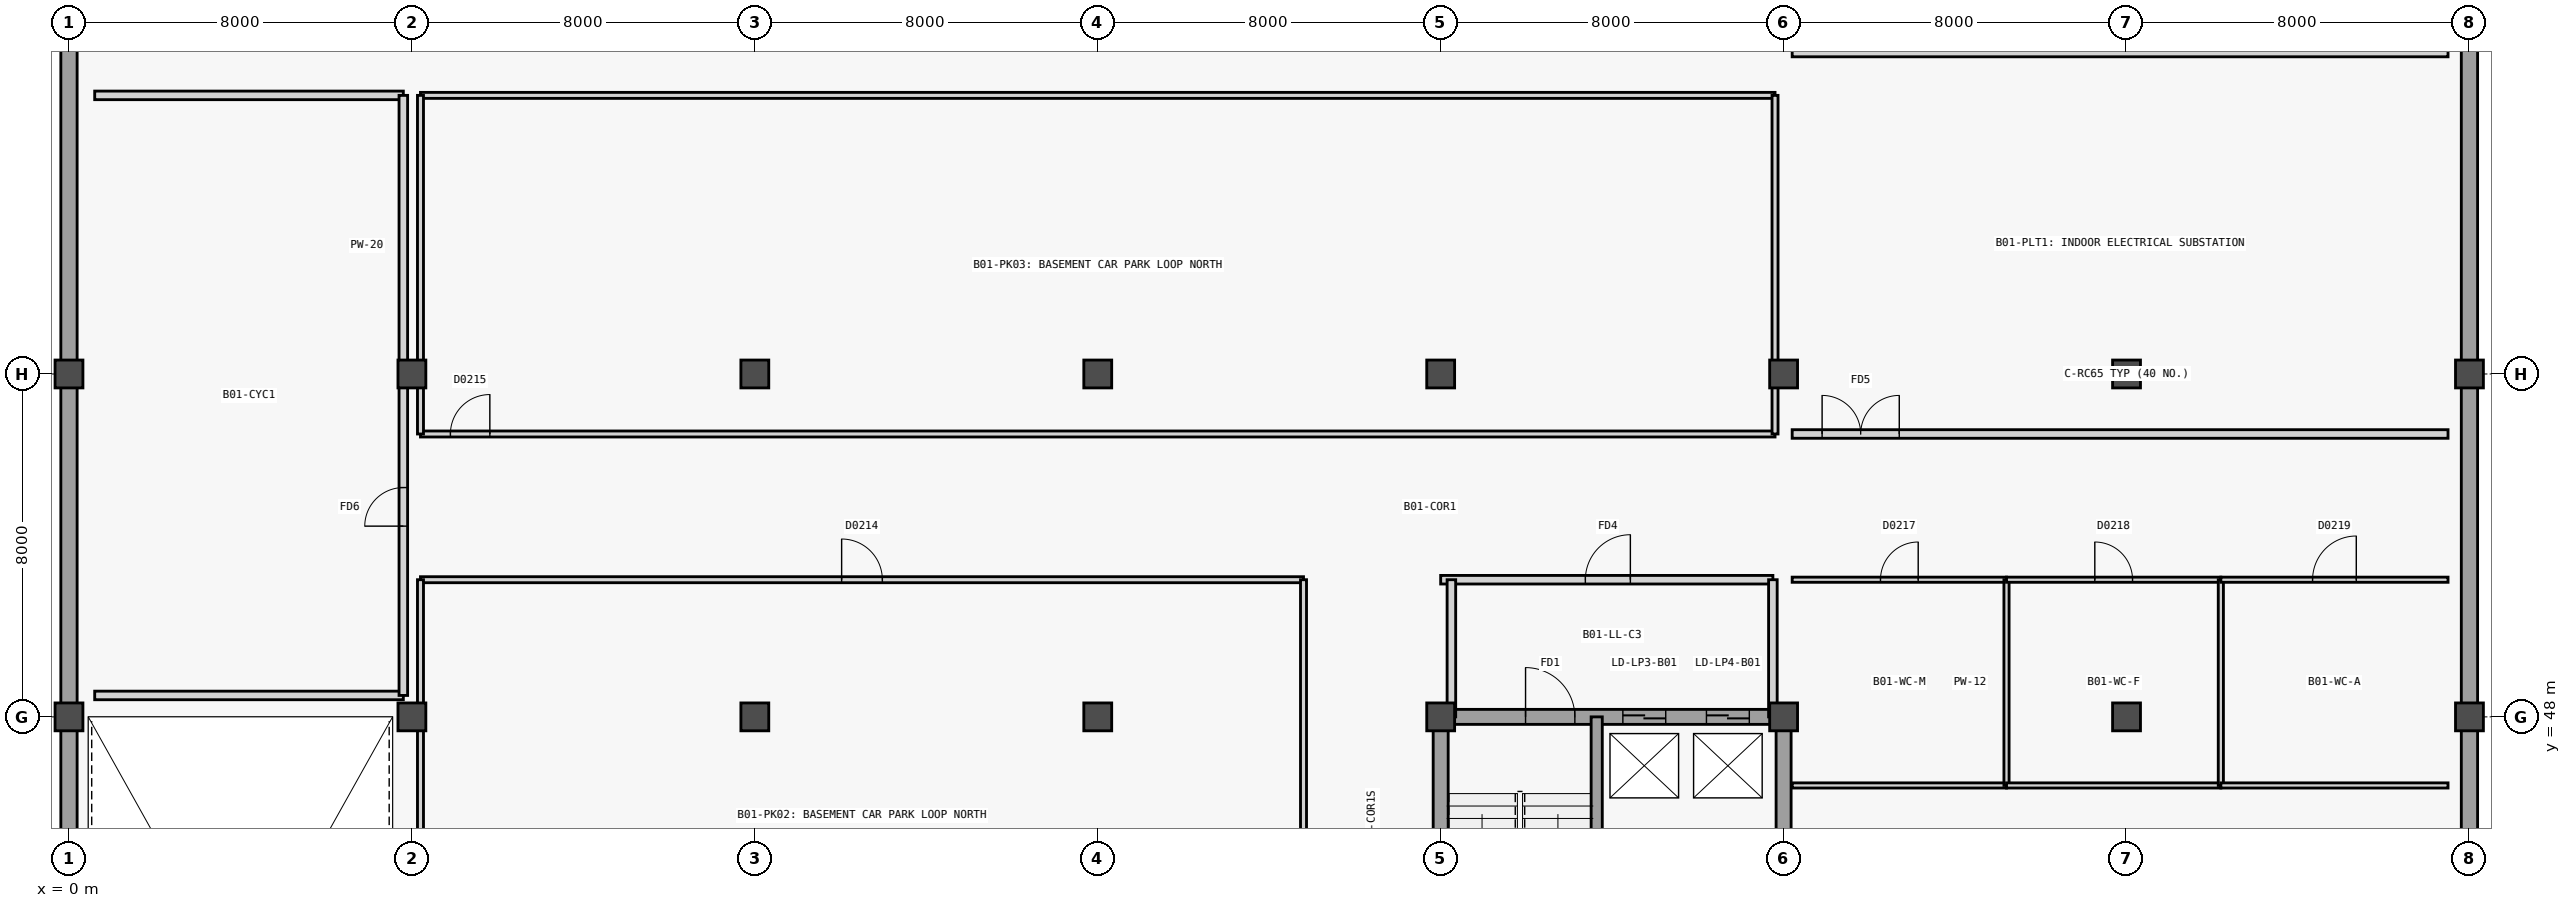
"""IFC4 building model, lengths in metres.
Left out: names, types, materials, properties, quantities, classifications, styles, units other than length and angle.
Written with IfcOpenShell. Run it as: python <this file> out.ifc"""

import sys

from ifc_helpers import new_model, si_unit, direction, frame, frame_2d, origin, origin_2d, place, context, subcontext, project, spatial, rectangle, extrude, element, fill, save


model = new_model("IFC4")
c1 = context("Model", 3, precision=1e-05, world=origin(), true_north=direction((0.0, 1.0)))
c2 = subcontext(c1, "Body", "Model", "MODEL_VIEW")
j1 = project(units=[si_unit("LENGTHUNIT", "METRE"), si_unit("PLANEANGLEUNIT", "RADIAN")], contexts=[c1])
p1 = place(None, origin())
s1 = spatial("IfcSite", under=j1, at=p1, CompositionType="ELEMENT")
p2 = place(p1, origin())
s2 = spatial("IfcBuilding", under=s1, at=p2, CompositionType="ELEMENT")
p3 = place(p2, frame((0.0, 0.0, -4.5)))
s3 = spatial("IfcBuildingStorey", under=s2, at=p3, CompositionType="ELEMENT", Elevation=-4.5)
for number, where, z_axis, x_axis in (
    (1, (0.0, 48.0, -0.45), (0.0, 0.0, 1.0), (1.0, 0.0, 0.0)),
    (2, (0.0, 56.0, -0.45), (0.0, 0.0, 1.0), (1.0, 0.0, 0.0)),
    (3, (8.0, 48.0, -0.45), (0.0, 0.0, 1.0), (1.0, 0.0, 0.0)),
    (4, (8.0, 56.0, -0.45), (0.0, 0.0, 1.0), (1.0, 0.0, 0.0)),
    (5, (16.0, 48.0, -0.45), (0.0, 0.0, 1.0), (1.0, 0.0, 0.0)),
    (6, (16.0, 56.0, -0.45), (0.0, 0.0, 1.0), (1.0, 0.0, 0.0)),
    (7, (24.0, 48.0, -0.45), (0.0, 0.0, 1.0), (1.0, 0.0, 0.0)),
    (8, (24.0, 56.0, -0.45), (0.0, 0.0, 1.0), (1.0, 0.0, 0.0)),
    (9, (32.0, 48.0, -0.45), (0.0, 0.0, 1.0), (1.0, 0.0, 0.0)),
    (10, (32.0, 56.0, -0.45), (0.0, 0.0, 1.0), (1.0, 0.0, 0.0)),
    (11, (40.0, 48.0, -0.45), (0.0, 0.0, 1.0), (1.0, 0.0, 0.0)),
    (12, (40.0, 56.0, -0.45), (0.0, 0.0, 1.0), (1.0, 0.0, 0.0)),
    (13, (48.0, 48.0, -0.45), (0.0, 0.0, 1.0), (1.0, 0.0, 0.0)),
    (14, (48.0, 56.0, -0.45), (0.0, 0.0, 1.0), (1.0, 0.0, 0.0)),
    (15, (56.0, 48.0, -0.45), (0.0, 0.0, 1.0), (1.0, 0.0, 0.0)),
    (16, (56.0, 56.0, -0.45), (0.0, 0.0, 1.0), (1.0, 0.0, 0.0)),
):
    element("IfcColumn", number, at=place(p3, frame(where, z_axis=z_axis, x_axis=x_axis)), inside=s3, PredefinedType="COLUMN", context=c2, shape_type="SweptSolid", body=[
        extrude(rectangle(XDim=0.65, YDim=0.65, at=origin_2d()), origin(), (0.0, 0.0, 1.0), 4.95),
    ])
for number, where, z_axis, x_axis in (
    (17, (0.0, 0.0, 0.0), (0.0, 0.0, 1.0), (0.0, 1.0, 0.0)),
    (18, (56.0, 64.0, 0.0), (0.0, 0.0, 1.0), (0.0, -1.0, 0.0)),
):
    element("IfcWall", number, at=place(p3, frame(where, z_axis=z_axis, x_axis=x_axis)), inside=s3, PredefinedType="USERDEFINED", context=c2, shape_type="SweptSolid", body=[
        extrude(rectangle(XDim=64.0, YDim=0.38, at=frame_2d((32.0, 0.0))), origin(), (0.0, 0.0, 1.0), 4.05),
    ])
for number, where, z_axis, x_axis in (
    (19, (32.0, 40.0, 0.0), (0.0, 0.0, 1.0), (0.0, 1.0, 0.0)),
    (20, (40.0, 40.0, 0.0), (0.0, 0.0, 1.0), (0.0, 1.0, 0.0)),
):
    element("IfcWall", number, at=place(p3, frame(where, z_axis=z_axis, x_axis=x_axis)), inside=s3, PredefinedType="SHEAR", context=c2, shape_type="SweptSolid", body=[
        extrude(rectangle(XDim=8.0, YDim=0.35, at=frame_2d((4.0, 0.0))), origin(), (0.0, 0.0, 1.0), 4.5),
    ])
p4 = place(p3, frame((32.0, 48.0, 0.0), z_axis=(0.0, 0.0, 1.0), x_axis=(1.0, 0.0, 0.0)))
e21 = element("IfcWall", 21, at=p4, inside=s3, PredefinedType="SHEAR", context=c2, shape_type="SweptSolid", body=[
    extrude(rectangle(XDim=8.0, YDim=0.35, at=frame_2d((4.0, 0.0))), origin(), (0.0, 0.0, 1.0), 4.5),
])
p5 = place(p4, frame((1.98, 0.0, 0.0)))
e22 = element("IfcOpeningElement", 22, at=p5, cuts=e21, PredefinedType="OPENING", context=c2, shape_type="SweptSolid", body=[
    extrude(rectangle(XDim=1.15, YDim=2.2, at=frame_2d((0.575, 1.1))), frame((0.0, 0.185, 0.0), z_axis=(0.0, -1.0, 0.0), x_axis=(1.0, 0.0, 0.0)), (0.0, 0.0, 1.0), 0.37),
])
p6 = place(p4, frame((4.25, 0.0, 0.0)))
e23 = element("IfcOpeningElement", 23, at=p6, cuts=e21, PredefinedType="OPENING", context=c2, shape_type="SweptSolid", body=[
    extrude(rectangle(XDim=1.0, YDim=2.15, at=frame_2d((0.5, 1.075))), frame((0.0, 0.185, 0.0), z_axis=(0.0, -1.0, 0.0), x_axis=(1.0, 0.0, 0.0)), (0.0, 0.0, 1.0), 0.37),
])
p7 = place(p4, frame((6.2, 0.0, 0.0)))
e24 = element("IfcOpeningElement", 24, at=p7, cuts=e21, PredefinedType="OPENING", context=c2, shape_type="SweptSolid", body=[
    extrude(rectangle(XDim=1.0, YDim=2.15, at=frame_2d((0.5, 1.075))), frame((0.0, 0.185, 0.0), z_axis=(0.0, -1.0, 0.0), x_axis=(1.0, 0.0, 0.0)), (0.0, 0.0, 1.0), 0.37),
])
p8 = place(p3, frame((35.64, 40.0, 0.0), z_axis=(0.0, 0.0, 1.0), x_axis=(0.0, 1.0, 0.0)))
e25 = element("IfcWall", 25, at=p8, inside=s3, PredefinedType="SHEAR", context=c2, shape_type="SweptSolid", body=[
    extrude(rectangle(XDim=8.0, YDim=0.26, at=frame_2d((4.0, 0.0))), origin(), (0.0, 0.0, 1.0), 4.5),
])
p9 = place(p3, frame((32.0, 51.2, 0.0), z_axis=(0.0, 0.0, 1.0), x_axis=(1.0, 0.0, 0.0)))
e26 = element("IfcWall", 26, at=p9, inside=s3, PredefinedType="PARTITIONING", context=c2, shape_type="SweptSolid", body=[
    extrude(rectangle(XDim=7.75, YDim=0.2, at=frame_2d((3.875, 0.0))), origin(), (0.0, 0.0, 1.0), 4.22),
])
p10 = place(p9, frame((3.375, 0.0, 0.0)))
e27 = element("IfcOpeningElement", 27, at=p10, cuts=e26, PredefinedType="OPENING", context=c2, shape_type="SweptSolid", body=[
    extrude(rectangle(XDim=1.05, YDim=2.15, at=frame_2d((0.525, 1.075))), frame((0.0, 0.11, 0.0), z_axis=(0.0, -1.0, 0.0), x_axis=(1.0, 0.0, 0.0)), (0.0, 0.0, 1.0), 0.22),
])
for number, where, z_axis, x_axis in (
    (28, (39.75, 48.0, 0.0), (0.0, 0.0, 1.0), (0.0, 1.0, 0.0)),
    (29, (32.25, 48.0, 0.0), (0.0, 0.0, 1.0), (0.0, 1.0, 0.0)),
):
    element("IfcWall", number, at=place(p3, frame(where, z_axis=z_axis, x_axis=x_axis)), inside=s3, PredefinedType="PARTITIONING", context=c2, shape_type="SweptSolid", body=[
        extrude(rectangle(XDim=3.2, YDim=0.2, at=frame_2d((1.6, 0.0))), origin(), (0.0, 0.0, 1.0), 3.6),
    ])
p11 = place(p3, frame((8.2, 51.2, 0.0), z_axis=(0.0, 0.0, 1.0), x_axis=(1.0, 0.0, 0.0)))
e30 = element("IfcWall", 30, at=p11, inside=s3, PredefinedType="PARTITIONING", context=c2, shape_type="SweptSolid", body=[
    extrude(rectangle(XDim=20.6, YDim=0.14, at=frame_2d((10.3, 0.0))), origin(), (0.0, 0.0, 1.0), 4.24),
])
p12 = place(p11, frame((9.825, 0.0, 0.0)))
e31 = element("IfcOpeningElement", 31, at=p12, cuts=e30, PredefinedType="OPENING", context=c2, shape_type="SweptSolid", body=[
    extrude(rectangle(XDim=0.95, YDim=2.1, at=frame_2d((0.475, 1.05))), frame((0.0, 0.08, 0.0), z_axis=(0.0, -1.0, 0.0), x_axis=(1.0, 0.0, 0.0)), (0.0, 0.0, 1.0), 0.16),
])
p13 = place(p3, frame((8.2, 40.2, 0.0), z_axis=(0.0, 0.0, 1.0), x_axis=(0.0, 1.0, 0.0)))
e32 = element("IfcWall", 32, at=p13, inside=s3, PredefinedType="PARTITIONING", context=c2, shape_type="SweptSolid", body=[
    extrude(rectangle(XDim=11.0, YDim=0.14, at=frame_2d((5.5, 0.0))), origin(), (0.0, 0.0, 1.0), 3.6),
])
p14 = place(p3, frame((28.8, 40.2, 0.0), z_axis=(0.0, 0.0, 1.0), x_axis=(0.0, 1.0, 0.0)))
e33 = element("IfcWall", 33, at=p14, inside=s3, PredefinedType="PARTITIONING", context=c2, shape_type="SweptSolid", body=[
    extrude(rectangle(XDim=11.0, YDim=0.14, at=frame_2d((5.5, 0.0))), origin(), (0.0, 0.0, 1.0), 4.24),
])
p15 = place(p3, frame((8.2, 54.6, 0.0), z_axis=(0.0, 0.0, 1.0), x_axis=(1.0, 0.0, 0.0)))
e34 = element("IfcWall", 34, at=p15, inside=s3, PredefinedType="PARTITIONING", context=c2, shape_type="SweptSolid", body=[
    extrude(rectangle(XDim=31.6, YDim=0.14, at=frame_2d((15.8, 0.0))), origin(), (0.0, 0.0, 1.0), 4.24),
])
p16 = place(p15, frame((0.698, 0.0, 0.0)))
e35 = element("IfcOpeningElement", 35, at=p16, cuts=e34, PredefinedType="OPENING", context=c2, shape_type="SweptSolid", body=[
    extrude(rectangle(XDim=0.92, YDim=2.15, at=frame_2d((0.46, 1.075))), frame((0.0, 0.08, 0.0), z_axis=(0.0, -1.0, 0.0), x_axis=(1.0, 0.0, 0.0)), (0.0, 0.0, 1.0), 0.16),
])
p17 = place(p3, frame((8.2, 62.5, 0.0), z_axis=(0.0, 0.0, 1.0), x_axis=(1.0, 0.0, 0.0)))
e36 = element("IfcWall", 36, at=p17, inside=s3, PredefinedType="PARTITIONING", context=c2, shape_type="SweptSolid", body=[
    extrude(rectangle(XDim=31.6, YDim=0.14, at=frame_2d((15.8, 0.0))), origin(), (0.0, 0.0, 1.0), 4.24),
])
for number, where, z_axis, x_axis in (
    (37, (8.2, 54.6, 0.0), (0.0, 0.0, 1.0), (0.0, 1.0, 0.0)),
    (38, (39.8, 54.6, 0.0), (0.0, 0.0, 1.0), (0.0, 1.0, 0.0)),
):
    element("IfcWall", number, at=place(p3, frame(where, z_axis=z_axis, x_axis=x_axis)), inside=s3, PredefinedType="PARTITIONING", context=c2, shape_type="SweptSolid", body=[
        extrude(rectangle(XDim=7.9, YDim=0.14, at=frame_2d((3.95, 0.0))), origin(), (0.0, 0.0, 1.0), 3.6),
    ])
for number, where, z_axis, x_axis in (
    (39, (0.6, 48.5, 0.0), (0.0, 0.0, 1.0), (1.0, 0.0, 0.0)),
    (40, (0.6, 62.5, 0.0), (0.0, 0.0, 1.0), (1.0, 0.0, 0.0)),
):
    element("IfcWall", number, at=place(p3, frame(where, z_axis=z_axis, x_axis=x_axis)), inside=s3, PredefinedType="PARTITIONING", context=c2, shape_type="SweptSolid", body=[
        extrude(rectangle(XDim=7.2, YDim=0.2, at=frame_2d((3.6, 0.0))), origin(), (0.0, 0.0, 1.0), 4.24),
    ])
p18 = place(p3, frame((7.8, 48.5, 0.0), z_axis=(0.0, 0.0, 1.0), x_axis=(0.0, 1.0, 0.0)))
e41 = element("IfcWall", 41, at=p18, inside=s3, PredefinedType="PARTITIONING", context=c2, shape_type="SweptSolid", body=[
    extrude(rectangle(XDim=14.0, YDim=0.2, at=frame_2d((7.0, 0.0))), origin(), (0.0, 0.0, 1.0), 3.6),
])
p19 = place(p18, frame((3.95, 0.0, 0.0)))
e42 = element("IfcOpeningElement", 42, at=p19, cuts=e41, PredefinedType="OPENING", context=c2, shape_type="SweptSolid", body=[
    extrude(rectangle(XDim=0.9, YDim=2.1, at=frame_2d((0.45, 1.05))), frame((0.0, 0.11, 0.0), z_axis=(0.0, -1.0, 0.0), x_axis=(1.0, 0.0, 0.0)), (0.0, 0.0, 1.0), 0.22),
])
p20 = place(p3, frame((40.2, 46.4, 0.0), z_axis=(0.0, 0.0, 1.0), x_axis=(1.0, 0.0, 0.0)))
e43 = element("IfcWall", 43, at=p20, inside=s3, PredefinedType="PARTITIONING", context=c2, shape_type="SweptSolid", body=[
    extrude(rectangle(XDim=5.0, YDim=0.12, at=frame_2d((2.5, 0.0))), origin(), (0.0, 0.0, 1.0), 4.24),
])
p21 = place(p3, frame((40.2, 51.2, 0.0), z_axis=(0.0, 0.0, 1.0), x_axis=(1.0, 0.0, 0.0)))
e44 = element("IfcWall", 44, at=p21, inside=s3, PredefinedType="PARTITIONING", context=c2, shape_type="SweptSolid", body=[
    extrude(rectangle(XDim=5.0, YDim=0.12, at=frame_2d((2.5, 0.0))), origin(), (0.0, 0.0, 1.0), 4.24),
])
p22 = place(p21, frame((2.06, 0.0, 0.0)))
e45 = element("IfcOpeningElement", 45, at=p22, cuts=e44, PredefinedType="OPENING", context=c2, shape_type="SweptSolid", body=[
    extrude(rectangle(XDim=0.88, YDim=2.1, at=frame_2d((0.44, 1.05))), frame((0.0, 0.07, 0.0), z_axis=(0.0, -1.0, 0.0), x_axis=(1.0, 0.0, 0.0)), (0.0, 0.0, 1.0), 0.14),
])
p23 = place(p3, frame((45.2, 46.4, 0.0), z_axis=(0.0, 0.0, 1.0), x_axis=(0.0, 1.0, 0.0)))
e46 = element("IfcWall", 46, at=p23, inside=s3, PredefinedType="PARTITIONING", context=c2, shape_type="SweptSolid", body=[
    extrude(rectangle(XDim=4.8, YDim=0.12, at=frame_2d((2.4, 0.0))), origin(), (0.0, 0.0, 1.0), 4.24),
])
p24 = place(p3, frame((45.2, 46.4, 0.0), z_axis=(0.0, 0.0, 1.0), x_axis=(1.0, 0.0, 0.0)))
e47 = element("IfcWall", 47, at=p24, inside=s3, PredefinedType="PARTITIONING", context=c2, shape_type="SweptSolid", body=[
    extrude(rectangle(XDim=5.0, YDim=0.12, at=frame_2d((2.5, 0.0))), origin(), (0.0, 0.0, 1.0), 4.24),
])
p25 = place(p3, frame((45.2, 51.2, 0.0), z_axis=(0.0, 0.0, 1.0), x_axis=(1.0, 0.0, 0.0)))
e48 = element("IfcWall", 48, at=p25, inside=s3, PredefinedType="PARTITIONING", context=c2, shape_type="SweptSolid", body=[
    extrude(rectangle(XDim=5.0, YDim=0.12, at=frame_2d((2.5, 0.0))), origin(), (0.0, 0.0, 1.0), 4.24),
])
p26 = place(p25, frame((2.06, 0.0, 0.0)))
e49 = element("IfcOpeningElement", 49, at=p26, cuts=e48, PredefinedType="OPENING", context=c2, shape_type="SweptSolid", body=[
    extrude(rectangle(XDim=0.88, YDim=2.1, at=frame_2d((0.44, 1.05))), frame((0.0, 0.07, 0.0), z_axis=(0.0, -1.0, 0.0), x_axis=(1.0, 0.0, 0.0)), (0.0, 0.0, 1.0), 0.14),
])
p27 = place(p3, frame((50.2, 46.4, 0.0), z_axis=(0.0, 0.0, 1.0), x_axis=(0.0, 1.0, 0.0)))
e50 = element("IfcWall", 50, at=p27, inside=s3, PredefinedType="PARTITIONING", context=c2, shape_type="SweptSolid", body=[
    extrude(rectangle(XDim=4.8, YDim=0.12, at=frame_2d((2.4, 0.0))), origin(), (0.0, 0.0, 1.0), 4.24),
])
p28 = place(p3, frame((50.2, 46.4, 0.0), z_axis=(0.0, 0.0, 1.0), x_axis=(1.0, 0.0, 0.0)))
e51 = element("IfcWall", 51, at=p28, inside=s3, PredefinedType="PARTITIONING", context=c2, shape_type="SweptSolid", body=[
    extrude(rectangle(XDim=5.3, YDim=0.12, at=frame_2d((2.65, 0.0))), origin(), (0.0, 0.0, 1.0), 4.24),
])
p29 = place(p3, frame((50.2, 51.2, 0.0), z_axis=(0.0, 0.0, 1.0), x_axis=(1.0, 0.0, 0.0)))
e52 = element("IfcWall", 52, at=p29, inside=s3, PredefinedType="PARTITIONING", context=c2, shape_type="SweptSolid", body=[
    extrude(rectangle(XDim=5.3, YDim=0.12, at=frame_2d((2.65, 0.0))), origin(), (0.0, 0.0, 1.0), 4.24),
])
p30 = place(p29, frame((2.14, 0.0, 0.0)))
e53 = element("IfcOpeningElement", 53, at=p30, cuts=e52, PredefinedType="OPENING", context=c2, shape_type="SweptSolid", body=[
    extrude(rectangle(XDim=1.02, YDim=2.1, at=frame_2d((0.51, 1.05))), frame((0.0, 0.07, 0.0), z_axis=(0.0, -1.0, 0.0), x_axis=(1.0, 0.0, 0.0)), (0.0, 0.0, 1.0), 0.14),
])
p31 = place(p3, frame((40.2, 54.6, 0.0), z_axis=(0.0, 0.0, 1.0), x_axis=(1.0, 0.0, 0.0)))
e54 = element("IfcWall", 54, at=p31, inside=s3, PredefinedType="PARTITIONING", context=c2, shape_type="SweptSolid", body=[
    extrude(rectangle(XDim=15.3, YDim=0.2, at=frame_2d((7.65, 0.0))), origin(), (0.0, 0.0, 1.0), 4.24),
])
p32 = place(p31, frame((0.698, 0.0, 0.0)))
e55 = element("IfcOpeningElement", 55, at=p32, cuts=e54, PredefinedType="OPENING", context=c2, shape_type="SweptSolid", body=[
    extrude(rectangle(XDim=1.8, YDim=2.25, at=frame_2d((0.9, 1.125))), frame((0.0, 0.11, 0.0), z_axis=(0.0, -1.0, 0.0), x_axis=(1.0, 0.0, 0.0)), (0.0, 0.0, 1.0), 0.22),
])
p33 = place(p3, frame((40.2, 63.5, 0.0), z_axis=(0.0, 0.0, 1.0), x_axis=(1.0, 0.0, 0.0)))
e56 = element("IfcWall", 56, at=p33, inside=s3, PredefinedType="PARTITIONING", context=c2, shape_type="SweptSolid", body=[
    extrude(rectangle(XDim=15.3, YDim=0.2, at=frame_2d((7.65, 0.0))), origin(), (0.0, 0.0, 1.0), 4.24),
])
p34 = place(p5, origin())
e57 = element("IfcDoor", 57, at=p34, inside=s3, OperationType="SINGLE_SWING_LEFT", PredefinedType="DOOR", context=c2, shape_type="SweptSolid", body=[
    extrude(rectangle(XDim=1.15, YDim=2.2, at=frame_2d((0.575, 1.1))), frame((0.0, 0.025, 0.0), z_axis=(0.0, -1.0, 0.0), x_axis=(1.0, 0.0, 0.0)), (0.0, 0.0, 1.0), 0.05),
])
fill(e22, e57)
p35 = place(p6, origin())
e58 = element("IfcDoor", 58, at=p35, inside=s3, OperationType="DOUBLE_DOOR_SLIDING", PredefinedType="DOOR", context=c2, shape_type="SweptSolid", body=[
    extrude(rectangle(XDim=1.0, YDim=2.15, at=frame_2d((0.5, 1.075))), frame((0.0, 0.025, 0.0), z_axis=(0.0, -1.0, 0.0), x_axis=(1.0, 0.0, 0.0)), (0.0, 0.0, 1.0), 0.05),
])
fill(e23, e58)
p36 = place(p7, origin())
e59 = element("IfcDoor", 59, at=p36, inside=s3, OperationType="DOUBLE_DOOR_SLIDING", PredefinedType="DOOR", context=c2, shape_type="SweptSolid", body=[
    extrude(rectangle(XDim=1.0, YDim=2.15, at=frame_2d((0.5, 1.075))), frame((0.0, 0.025, 0.0), z_axis=(0.0, -1.0, 0.0), x_axis=(1.0, 0.0, 0.0)), (0.0, 0.0, 1.0), 0.05),
])
fill(e24, e59)
p37 = place(p10, origin())
e60 = element("IfcDoor", 60, at=p37, inside=s3, OperationType="SINGLE_SWING_RIGHT", PredefinedType="DOOR", context=c2, shape_type="SweptSolid", body=[
    extrude(rectangle(XDim=1.05, YDim=2.15, at=frame_2d((0.525, 1.075))), frame((0.0, 0.025, 0.0), z_axis=(0.0, -1.0, 0.0), x_axis=(1.0, 0.0, 0.0)), (0.0, 0.0, 1.0), 0.05),
])
fill(e27, e60)
p38 = place(p12, origin())
e61 = element("IfcDoor", 61, at=p38, inside=s3, OperationType="SINGLE_SWING_LEFT", PredefinedType="DOOR", context=c2, shape_type="SweptSolid", body=[
    extrude(rectangle(XDim=0.95, YDim=2.1, at=frame_2d((0.475, 1.05))), frame((0.0, 0.025, 0.0), z_axis=(0.0, -1.0, 0.0), x_axis=(1.0, 0.0, 0.0)), (0.0, 0.0, 1.0), 0.05),
])
fill(e31, e61)
p39 = place(p16, origin())
e62 = element("IfcDoor", 62, at=p39, inside=s3, OperationType="SINGLE_SWING_RIGHT", PredefinedType="DOOR", context=c2, shape_type="SweptSolid", body=[
    extrude(rectangle(XDim=0.92, YDim=2.15, at=frame_2d((0.46, 1.075))), frame((0.0, 0.025, 0.0), z_axis=(0.0, -1.0, 0.0), x_axis=(1.0, 0.0, 0.0)), (0.0, 0.0, 1.0), 0.05),
])
fill(e35, e62)
p40 = place(p19, origin())
e63 = element("IfcDoor", 63, at=p40, inside=s3, OperationType="SINGLE_SWING_LEFT", PredefinedType="DOOR", context=c2, shape_type="SweptSolid", body=[
    extrude(rectangle(XDim=0.9, YDim=2.1, at=frame_2d((0.45, 1.05))), frame((0.0, 0.025, 0.0), z_axis=(0.0, -1.0, 0.0), x_axis=(1.0, 0.0, 0.0)), (0.0, 0.0, 1.0), 0.05),
])
fill(e42, e63)
p41 = place(p22, origin())
e64 = element("IfcDoor", 64, at=p41, inside=s3, OperationType="SINGLE_SWING_RIGHT", PredefinedType="DOOR", context=c2, shape_type="SweptSolid", body=[
    extrude(rectangle(XDim=0.88, YDim=2.1, at=frame_2d((0.44, 1.05))), frame((0.0, 0.025, 0.0), z_axis=(0.0, -1.0, 0.0), x_axis=(1.0, 0.0, 0.0)), (0.0, 0.0, 1.0), 0.05),
])
fill(e45, e64)
p42 = place(p26, origin())
e65 = element("IfcDoor", 65, at=p42, inside=s3, OperationType="SINGLE_SWING_LEFT", PredefinedType="DOOR", context=c2, shape_type="SweptSolid", body=[
    extrude(rectangle(XDim=0.88, YDim=2.1, at=frame_2d((0.44, 1.05))), frame((0.0, 0.025, 0.0), z_axis=(0.0, -1.0, 0.0), x_axis=(1.0, 0.0, 0.0)), (0.0, 0.0, 1.0), 0.05),
])
fill(e49, e65)
p43 = place(p30, origin())
e66 = element("IfcDoor", 66, at=p43, inside=s3, OperationType="SINGLE_SWING_RIGHT", PredefinedType="DOOR", context=c2, shape_type="SweptSolid", body=[
    extrude(rectangle(XDim=1.02, YDim=2.1, at=frame_2d((0.51, 1.05))), frame((0.0, 0.025, 0.0), z_axis=(0.0, -1.0, 0.0), x_axis=(1.0, 0.0, 0.0)), (0.0, 0.0, 1.0), 0.05),
])
fill(e53, e66)
p44 = place(p32, origin())
e67 = element("IfcDoor", 67, at=p44, inside=s3, OperationType="DOUBLE_DOOR_SINGLE_SWING", PredefinedType="DOOR", context=c2, shape_type="SweptSolid", body=[
    extrude(rectangle(XDim=1.8, YDim=2.25, at=frame_2d((0.9, 1.125))), frame((0.0, 0.025, 0.0), z_axis=(0.0, -1.0, 0.0), x_axis=(1.0, 0.0, 0.0)), (0.0, 0.0, 1.0), 0.05),
])
fill(e55, e67)
save(model, sys.argv[1])
